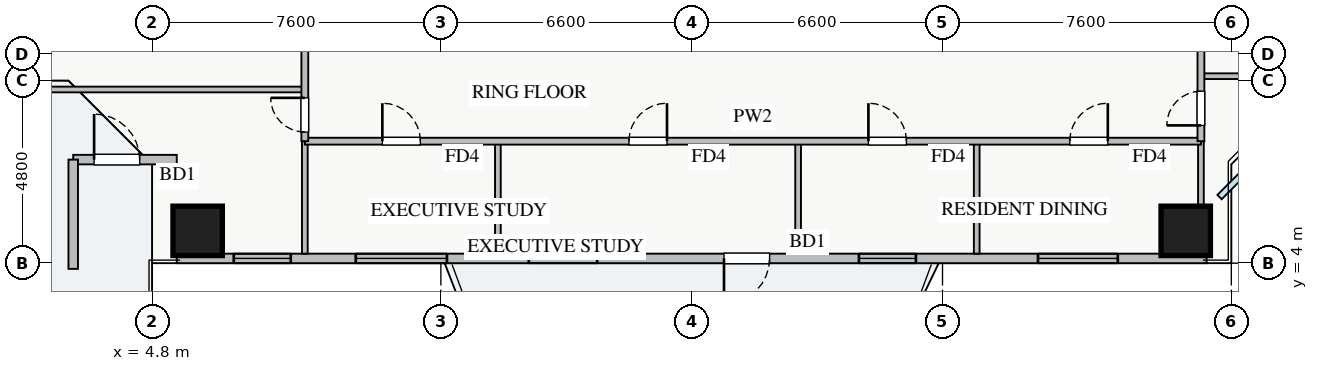
"""IFC4 building model, lengths in metres.
Left out: names, types, materials, properties, quantities, classifications, styles, units other than length and angle.
Written with IfcOpenShell. Run it as: python <this file> out.ifc"""

import sys

from ifc_helpers import new_model, si_unit, direction, frame, frame_2d, origin, origin_2d, place, context, subcontext, project, spatial, rectangle, extrude, source, transform, mapped, element, fill, save


model = new_model("IFC4")
c1 = context("Model", 3, precision=1e-05, world=origin(), true_north=direction((0.0, 1.0)))
c2 = subcontext(c1, "Body", "Model", "MODEL_VIEW")
j1 = project(units=[si_unit("LENGTHUNIT", "METRE"), si_unit("PLANEANGLEUNIT", "RADIAN")], contexts=[c1])
p1 = place(None, origin())
s1 = spatial("IfcSite", under=j1, at=p1, CompositionType="ELEMENT")
p2 = place(p1, origin())
s2 = spatial("IfcBuilding", under=s1, at=p2, CompositionType="ELEMENT")
p3 = place(p2, frame((0.0, 0.0, 53.5)))
s3 = spatial("IfcBuildingStorey", under=s2, at=p3, CompositionType="ELEMENT", Elevation=53.5)
m1 = source(origin(), c2, "Body", "SweptSolid", [
    extrude(rectangle(XDim=1.3, YDim=1.3, at=origin_2d()), origin(), (0.0, 0.0, 1.0), 3.25),
])
for number, where, z_axis, x_axis in (
    (1, (6.0, 4.85, 0.0), (0.0, 0.0, 1.0), (1.0, 0.0, 0.0)),
    (2, (32.0, 4.85, 0.0), (0.0, 0.0, 1.0), (1.0, 0.0, 0.0)),
):
    element("IfcColumn", number, at=place(p3, frame(where, z_axis=z_axis, x_axis=x_axis)), inside=s3, PredefinedType="COLUMN", context=c2, shape_type="MappedRepresentation", body=[
        mapped(m1, transform((0.0, 0.0, 0.0), x_axis=(1.0, 0.0, 0.0), y_axis=(0.0, 1.0, 0.0), z_axis=(0.0, 0.0, 1.0), scale=1.0)),
    ])
p4 = place(p3, frame((5.45, 4.125, 0.0), z_axis=(0.0, 0.0, 1.0), x_axis=(1.0, 0.0, 0.0)))
e3 = element("IfcWall", 3, at=p4, inside=s3, PredefinedType="STANDARD", context=c2, shape_type="SweptSolid", body=[
    extrude(rectangle(XDim=27.1, YDim=0.25, at=frame_2d((13.55, 0.0))), origin(), (0.0, 0.0, 1.0), 2.61),
])
p5 = place(p4, frame((14.4, 0.0, 0.0)))
e4 = element("IfcOpeningElement", 4, at=p5, cuts=e3, PredefinedType="OPENING", context=c2, shape_type="SweptSolid", body=[
    extrude(rectangle(XDim=1.2, YDim=2.1, at=frame_2d((0.6, 1.05))), frame((0.0, 0.135, 0.0), z_axis=(0.0, -1.0, 0.0), x_axis=(1.0, 0.0, 0.0)), (0.0, 0.0, 1.0), 0.27),
])
p6 = place(p4, frame((1.5, 0.0, 0.9)))
e5 = element("IfcOpeningElement", 5, at=p6, cuts=e3, PredefinedType="OPENING", context=c2, shape_type="SweptSolid", body=[
    extrude(rectangle(XDim=1.5, YDim=1.5, at=frame_2d((0.75, 0.75))), frame((0.0, 0.135, 0.0), z_axis=(0.0, -1.0, 0.0), x_axis=(1.0, 0.0, 0.0)), (0.0, 0.0, 1.0), 0.27),
])
p7 = place(p4, frame((9.263, 0.0, 0.9)))
e6 = element("IfcOpeningElement", 6, at=p7, cuts=e3, PredefinedType="OPENING", context=c2, shape_type="SweptSolid", body=[
    extrude(rectangle(XDim=1.8, YDim=1.45, at=frame_2d((0.9, 0.725))), frame((0.0, 0.135, 0.0), z_axis=(0.0, -1.0, 0.0), x_axis=(1.0, 0.0, 0.0)), (0.0, 0.0, 1.0), 0.27),
])
p8 = place(p4, frame((17.95, 0.0, 0.9)))
e7 = element("IfcOpeningElement", 7, at=p8, cuts=e3, PredefinedType="OPENING", context=c2, shape_type="SweptSolid", body=[
    extrude(rectangle(XDim=1.5, YDim=1.5, at=frame_2d((0.75, 0.75))), frame((0.0, 0.135, 0.0), z_axis=(0.0, -1.0, 0.0), x_axis=(1.0, 0.0, 0.0)), (0.0, 0.0, 1.0), 0.27),
])
p9 = place(p4, frame((22.663, 0.0, 0.9)))
e8 = element("IfcOpeningElement", 8, at=p9, cuts=e3, PredefinedType="OPENING", context=c2, shape_type="SweptSolid", body=[
    extrude(rectangle(XDim=2.1, YDim=1.48, at=frame_2d((1.05, 0.74))), frame((0.0, 0.135, 0.0), z_axis=(0.0, -1.0, 0.0), x_axis=(1.0, 0.0, 0.0)), (0.0, 0.0, 1.0), 0.27),
])
p10 = place(p4, frame((4.71, 0.0, 0.9)))
e9 = element("IfcOpeningElement", 9, at=p10, cuts=e3, PredefinedType="OPENING", context=c2, shape_type="SweptSolid", body=[
    extrude(rectangle(XDim=2.4, YDim=1.5, at=frame_2d((1.2, 0.75))), frame((0.0, 0.135, 0.0), z_axis=(0.0, -1.0, 0.0), x_axis=(1.0, 0.0, 0.0)), (0.0, 0.0, 1.0), 0.27),
])
p11 = place(p3, frame((2.725, 6.725, 0.0), z_axis=(0.0, 0.0, 1.0), x_axis=(1.0, 0.0, 0.0)))
e10 = element("IfcWall", 10, at=p11, inside=s3, PredefinedType="STANDARD", context=c2, shape_type="SweptSolid", body=[
    extrude(rectangle(XDim=2.725, YDim=0.25, at=frame_2d((1.362, 0.0))), origin(), (0.0, 0.0, 1.0), 2.61),
])
p12 = place(p11, frame((0.55, 0.0, 0.0)))
e11 = element("IfcOpeningElement", 11, at=p12, cuts=e10, PredefinedType="OPENING", context=c2, shape_type="SweptSolid", body=[
    extrude(rectangle(XDim=1.2, YDim=2.1, at=frame_2d((0.6, 1.05))), frame((0.0, 0.135, 0.0), z_axis=(0.0, -1.0, 0.0), x_axis=(1.0, 0.0, 0.0)), (0.0, 0.0, 1.0), 0.27),
])
p13 = place(p3, frame((2.725, 3.85, 0.0), z_axis=(0.0, 0.0, 1.0), x_axis=(0.0, 1.0, 0.0)))
e12 = element("IfcWall", 12, at=p13, inside=s3, PredefinedType="STANDARD", context=c2, shape_type="SweptSolid", body=[
    extrude(rectangle(XDim=2.875, YDim=0.25, at=frame_2d((1.438, 0.0))), origin(), (0.0, 0.0, 1.0), 2.61),
])
for number, where, z_axis, x_axis in (
    (13, (13.9, 4.25, 0.0), (0.0, 0.0, 1.0), (0.0, 1.0, 0.0)),
    (14, (21.8, 4.25, 0.0), (0.0, 0.0, 1.0), (0.0, 1.0, 0.0)),
    (15, (26.5, 4.25, 0.0), (0.0, 0.0, 1.0), (0.0, 1.0, 0.0)),
    (16, (8.82, 4.25, 0.0), (0.0, 0.0, 1.0), (0.0, 1.0, 0.0)),
    (17, (32.4, 4.25, 0.0), (0.0, 0.0, 1.0), (0.0, 1.0, 0.0)),
):
    element("IfcWall", number, at=place(p3, frame(where, z_axis=z_axis, x_axis=x_axis)), inside=s3, PredefinedType="PARTITIONING", context=c2, shape_type="SweptSolid", body=[
        extrude(rectangle(XDim=2.96, YDim=0.15, at=frame_2d((1.48, 0.0))), origin(), (0.0, 0.0, 1.0), 3.07),
    ])
p14 = place(p3, frame((8.82, 7.21, 0.0), z_axis=(0.0, 0.0, 1.0), x_axis=(1.0, 0.0, 0.0)))
e18 = element("IfcWall", 18, at=p14, inside=s3, PredefinedType="PARTITIONING", context=c2, shape_type="SweptSolid", body=[
    extrude(rectangle(XDim=23.58, YDim=0.18, at=frame_2d((11.79, 0.0))), origin(), (0.0, 0.0, 1.0), 3.07),
])
p15 = place(p14, frame((2.04, 0.0, 0.0)))
e19 = element("IfcOpeningElement", 19, at=p15, cuts=e18, PredefinedType="OPENING", context=c2, shape_type="SweptSolid", body=[
    extrude(rectangle(XDim=1.0, YDim=2.05, at=frame_2d((0.5, 1.025))), frame((0.0, 0.1, 0.0), z_axis=(0.0, -1.0, 0.0), x_axis=(1.0, 0.0, 0.0)), (0.0, 0.0, 1.0), 0.2),
])
p16 = place(p14, frame((8.53, 0.0, 0.0)))
e20 = element("IfcOpeningElement", 20, at=p16, cuts=e18, PredefinedType="OPENING", context=c2, shape_type="SweptSolid", body=[
    extrude(rectangle(XDim=1.0, YDim=2.05, at=frame_2d((0.5, 1.025))), frame((0.0, 0.1, 0.0), z_axis=(0.0, -1.0, 0.0), x_axis=(1.0, 0.0, 0.0)), (0.0, 0.0, 1.0), 0.2),
])
p17 = place(p14, frame((14.83, 0.0, 0.0)))
e21 = element("IfcOpeningElement", 21, at=p17, cuts=e18, PredefinedType="OPENING", context=c2, shape_type="SweptSolid", body=[
    extrude(rectangle(XDim=1.0, YDim=2.05, at=frame_2d((0.5, 1.025))), frame((0.0, 0.1, 0.0), z_axis=(0.0, -1.0, 0.0), x_axis=(1.0, 0.0, 0.0)), (0.0, 0.0, 1.0), 0.2),
])
p18 = place(p14, frame((20.13, 0.0, 0.0)))
e22 = element("IfcOpeningElement", 22, at=p18, cuts=e18, PredefinedType="OPENING", context=c2, shape_type="SweptSolid", body=[
    extrude(rectangle(XDim=1.0, YDim=2.05, at=frame_2d((0.5, 1.025))), frame((0.0, 0.1, 0.0), z_axis=(0.0, -1.0, 0.0), x_axis=(1.0, 0.0, 0.0)), (0.0, 0.0, 1.0), 0.2),
])
p19 = place(p3, frame((0.25, 8.57, 0.0), z_axis=(0.0, 0.0, 1.0), x_axis=(1.0, 0.0, 0.0)))
e23 = element("IfcWall", 23, at=p19, inside=s3, PredefinedType="PARTITIONING", context=c2, shape_type="SweptSolid", body=[
    extrude(rectangle(XDim=8.57, YDim=0.15, at=frame_2d((4.285, 0.0))), origin(), (0.0, 0.0, 1.0), 3.07),
])
p20 = place(p3, frame((8.82, 7.21, 0.0), z_axis=(0.0, 0.0, 1.0), x_axis=(0.0, 1.0, 0.0)))
e24 = element("IfcWall", 24, at=p20, inside=s3, PredefinedType="PARTITIONING", context=c2, shape_type="SweptSolid", body=[
    extrude(rectangle(XDim=31.23, YDim=0.18, at=frame_2d((15.615, 0.0))), origin(), (0.0, 0.0, 1.0), 3.07),
])
p21 = place(p20, frame((30.09, 0.0, 0.0)))
e25 = element("IfcOpeningElement", 25, at=p21, cuts=e24, PredefinedType="OPENING", context=c2, shape_type="SweptSolid", body=[
    extrude(rectangle(XDim=0.9, YDim=2.05, at=frame_2d((0.45, 1.025))), frame((0.0, 0.1, 0.0), z_axis=(0.0, -1.0, 0.0), x_axis=(1.0, 0.0, 0.0)), (0.0, 0.0, 1.0), 0.2),
])
p22 = place(p20, frame((0.24, 0.0, 0.0)))
e26 = element("IfcOpeningElement", 26, at=p22, cuts=e24, PredefinedType="OPENING", context=c2, shape_type="SweptSolid", body=[
    extrude(rectangle(XDim=0.9, YDim=2.05, at=frame_2d((0.45, 1.025))), frame((0.0, 0.1, 0.0), z_axis=(0.0, -1.0, 0.0), x_axis=(1.0, 0.0, 0.0)), (0.0, 0.0, 1.0), 0.2),
])
p23 = place(p20, frame((2.95, 0.0, 0.0)))
e27 = element("IfcOpeningElement", 27, at=p23, cuts=e24, PredefinedType="OPENING", context=c2, shape_type="SweptSolid", body=[
    extrude(rectangle(XDim=1.0, YDim=2.05, at=frame_2d((0.5, 1.025))), frame((0.0, 0.1, 0.0), z_axis=(0.0, -1.0, 0.0), x_axis=(1.0, 0.0, 0.0)), (0.0, 0.0, 1.0), 0.2),
])
p24 = place(p20, frame((15.115, 0.0, 0.0)))
e28 = element("IfcOpeningElement", 28, at=p24, cuts=e24, PredefinedType="OPENING", context=c2, shape_type="SweptSolid", body=[
    extrude(rectangle(XDim=1.0, YDim=2.05, at=frame_2d((0.5, 1.025))), frame((0.0, 0.1, 0.0), z_axis=(0.0, -1.0, 0.0), x_axis=(1.0, 0.0, 0.0)), (0.0, 0.0, 1.0), 0.2),
])
p25 = place(p20, frame((21.96, 0.0, 0.0)))
e29 = element("IfcOpeningElement", 29, at=p25, cuts=e24, PredefinedType="OPENING", context=c2, shape_type="SweptSolid", body=[
    extrude(rectangle(XDim=1.0, YDim=2.05, at=frame_2d((0.5, 1.025))), frame((0.0, 0.1, 0.0), z_axis=(0.0, -1.0, 0.0), x_axis=(1.0, 0.0, 0.0)), (0.0, 0.0, 1.0), 0.2),
])
p26 = place(p3, frame((32.4, 8.92, 0.0), z_axis=(0.0, 0.0, 1.0), x_axis=(1.0, 0.0, 0.0)))
e30 = element("IfcWall", 30, at=p26, inside=s3, PredefinedType="PARTITIONING", context=c2, shape_type="SweptSolid", body=[
    extrude(rectangle(XDim=5.35, YDim=0.15, at=frame_2d((2.675, 0.0))), origin(), (0.0, 0.0, 1.0), 3.07),
])
p27 = place(p3, frame((32.4, 7.21, 0.0), z_axis=(0.0, 0.0, 1.0), x_axis=(0.0, 1.0, 0.0)))
e31 = element("IfcWall", 31, at=p27, inside=s3, PredefinedType="PARTITIONING", context=c2, shape_type="SweptSolid", body=[
    extrude(rectangle(XDim=31.23, YDim=0.18, at=frame_2d((15.615, 0.0))), origin(), (0.0, 0.0, 1.0), 2.771),
])
p28 = place(p27, frame((30.09, 0.0, 0.0)))
e32 = element("IfcOpeningElement", 32, at=p28, cuts=e31, PredefinedType="OPENING", context=c2, shape_type="SweptSolid", body=[
    extrude(rectangle(XDim=0.9, YDim=2.05, at=frame_2d((0.45, 1.025))), frame((0.0, 0.1, 0.0), z_axis=(0.0, -1.0, 0.0), x_axis=(1.0, 0.0, 0.0)), (0.0, 0.0, 1.0), 0.2),
])
p29 = place(p27, frame((0.415, 0.0, 0.0)))
e33 = element("IfcOpeningElement", 33, at=p29, cuts=e31, PredefinedType="OPENING", context=c2, shape_type="SweptSolid", body=[
    extrude(rectangle(XDim=0.9, YDim=2.05, at=frame_2d((0.45, 1.025))), frame((0.0, 0.1, 0.0), z_axis=(0.0, -1.0, 0.0), x_axis=(1.0, 0.0, 0.0)), (0.0, 0.0, 1.0), 0.2),
])
p30 = place(p27, frame((3.585, 0.0, 0.0)))
e34 = element("IfcOpeningElement", 34, at=p30, cuts=e31, PredefinedType="OPENING", context=c2, shape_type="SweptSolid", body=[
    extrude(rectangle(XDim=1.0, YDim=2.05, at=frame_2d((0.5, 1.025))), frame((0.0, 0.1, 0.0), z_axis=(0.0, -1.0, 0.0), x_axis=(1.0, 0.0, 0.0)), (0.0, 0.0, 1.0), 0.2),
])
p31 = place(p27, frame((12.86, 0.0, 0.0)))
e35 = element("IfcOpeningElement", 35, at=p31, cuts=e31, PredefinedType="OPENING", context=c2, shape_type="SweptSolid", body=[
    extrude(rectangle(XDim=1.0, YDim=2.05, at=frame_2d((0.5, 1.025))), frame((0.0, 0.1, 0.0), z_axis=(0.0, -1.0, 0.0), x_axis=(1.0, 0.0, 0.0)), (0.0, 0.0, 1.0), 0.2),
])
p32 = place(p27, frame((22.5, 0.0, 0.0)))
e36 = element("IfcOpeningElement", 36, at=p32, cuts=e31, PredefinedType="OPENING", context=c2, shape_type="SweptSolid", body=[
    extrude(rectangle(XDim=1.0, YDim=2.05, at=frame_2d((0.5, 1.025))), frame((0.0, 0.1, 0.0), z_axis=(0.0, -1.0, 0.0), x_axis=(1.0, 0.0, 0.0)), (0.0, 0.0, 1.0), 0.2),
])
m2 = source(origin(), c2, "Body", "SweptSolid", [
    extrude(rectangle(XDim=1.2, YDim=2.1, at=frame_2d((0.6, 1.05))), frame((0.0, 0.025, 0.0), z_axis=(0.0, -1.0, 0.0), x_axis=(1.0, 0.0, 0.0)), (0.0, 0.0, 1.0), 0.05),
])
p33 = place(p5, frame((1.2, 0.0, 0.0), z_axis=(0.0, 0.0, 1.0), x_axis=(-1.0, 0.0, 0.0)))
e37 = element("IfcDoor", 37, at=p33, inside=s3, OperationType="SINGLE_SWING_LEFT", PredefinedType="DOOR", context=c2, shape_type="MappedRepresentation", body=[
    mapped(m2, transform((0.0, 0.0, 0.0), x_axis=(1.0, 0.0, 0.0), y_axis=(0.0, 1.0, 0.0), z_axis=(0.0, 0.0, 1.0), scale=1.0)),
])
fill(e4, e37)
m3 = source(origin(), c2, "Body", "SweptSolid", [
    extrude(rectangle(XDim=1.5, YDim=1.5, at=frame_2d((0.75, 0.75))), frame((0.0, 0.03, 0.0), z_axis=(0.0, -1.0, 0.0), x_axis=(1.0, 0.0, 0.0)), (0.0, 0.0, 1.0), 0.06),
])
p34 = place(p6, origin())
e38 = element("IfcWindow", 38, at=p34, inside=s3, PartitioningType="TRIPLE_PANEL_VERTICAL", PredefinedType="WINDOW", context=c2, shape_type="MappedRepresentation", body=[
    mapped(m3, transform((0.0, 0.0, 0.0), x_axis=(1.0, 0.0, 0.0), y_axis=(0.0, 1.0, 0.0), z_axis=(0.0, 0.0, 1.0), scale=1.0)),
])
fill(e5, e38)
m4 = source(origin(), c2, "Body", "SweptSolid", [
    extrude(rectangle(XDim=1.8, YDim=1.45, at=frame_2d((0.9, 0.725))), frame((0.0, 0.03, 0.0), z_axis=(0.0, -1.0, 0.0), x_axis=(1.0, 0.0, 0.0)), (0.0, 0.0, 1.0), 0.06),
])
p35 = place(p7, origin())
e39 = element("IfcWindow", 39, at=p35, inside=s3, PartitioningType="DOUBLE_PANEL_VERTICAL", PredefinedType="WINDOW", context=c2, shape_type="MappedRepresentation", body=[
    mapped(m4, transform((0.0, 0.0, 0.0), x_axis=(1.0, 0.0, 0.0), y_axis=(0.0, 1.0, 0.0), z_axis=(0.0, 0.0, 1.0), scale=1.0)),
])
fill(e6, e39)
p36 = place(p8, origin())
e40 = element("IfcWindow", 40, at=p36, inside=s3, PartitioningType="DOUBLE_PANEL_VERTICAL", PredefinedType="WINDOW", context=c2, shape_type="MappedRepresentation", body=[
    mapped(m3, transform((0.0, 0.0, 0.0), x_axis=(1.0, 0.0, 0.0), y_axis=(0.0, 1.0, 0.0), z_axis=(0.0, 0.0, 1.0), scale=1.0)),
])
fill(e7, e40)
m5 = source(origin(), c2, "Body", "SweptSolid", [
    extrude(rectangle(XDim=2.1, YDim=1.48, at=frame_2d((1.05, 0.74))), frame((0.0, 0.03, 0.0), z_axis=(0.0, -1.0, 0.0), x_axis=(1.0, 0.0, 0.0)), (0.0, 0.0, 1.0), 0.06),
])
p37 = place(p9, origin())
e41 = element("IfcWindow", 41, at=p37, inside=s3, PartitioningType="TRIPLE_PANEL_VERTICAL", PredefinedType="WINDOW", context=c2, shape_type="MappedRepresentation", body=[
    mapped(m5, transform((0.0, 0.0, 0.0), x_axis=(1.0, 0.0, 0.0), y_axis=(0.0, 1.0, 0.0), z_axis=(0.0, 0.0, 1.0), scale=1.0)),
])
fill(e8, e41)
p38 = place(p12, origin())
e42 = element("IfcDoor", 42, at=p38, inside=s3, OperationType="SINGLE_SWING_LEFT", PredefinedType="DOOR", context=c2, shape_type="MappedRepresentation", body=[
    mapped(m2, transform((0.0, 0.0, 0.0), x_axis=(1.0, 0.0, 0.0), y_axis=(0.0, 1.0, 0.0), z_axis=(0.0, 0.0, 1.0), scale=1.0)),
])
fill(e11, e42)
m6 = source(origin(), c2, "Body", "SweptSolid", [
    extrude(rectangle(XDim=1.0, YDim=2.05, at=frame_2d((0.5, 1.025))), frame((0.0, 0.025, 0.0), z_axis=(0.0, -1.0, 0.0), x_axis=(1.0, 0.0, 0.0)), (0.0, 0.0, 1.0), 0.05),
])
p39 = place(p15, origin())
e43 = element("IfcDoor", 43, at=p39, inside=s3, OperationType="SINGLE_SWING_LEFT", PredefinedType="DOOR", context=c2, shape_type="MappedRepresentation", body=[
    mapped(m6, transform((0.0, 0.0, 0.0), x_axis=(1.0, 0.0, 0.0), y_axis=(0.0, 1.0, 0.0), z_axis=(0.0, 0.0, 1.0), scale=1.0)),
])
fill(e19, e43)
p40 = place(p16, origin())
e44 = element("IfcDoor", 44, at=p40, inside=s3, OperationType="SINGLE_SWING_RIGHT", PredefinedType="DOOR", context=c2, shape_type="MappedRepresentation", body=[
    mapped(m6, transform((0.0, 0.0, 0.0), x_axis=(1.0, 0.0, 0.0), y_axis=(0.0, 1.0, 0.0), z_axis=(0.0, 0.0, 1.0), scale=1.0)),
])
fill(e20, e44)
p41 = place(p17, origin())
e45 = element("IfcDoor", 45, at=p41, inside=s3, OperationType="SINGLE_SWING_LEFT", PredefinedType="DOOR", context=c2, shape_type="MappedRepresentation", body=[
    mapped(m6, transform((0.0, 0.0, 0.0), x_axis=(1.0, 0.0, 0.0), y_axis=(0.0, 1.0, 0.0), z_axis=(0.0, 0.0, 1.0), scale=1.0)),
])
fill(e21, e45)
p42 = place(p18, origin())
e46 = element("IfcDoor", 46, at=p42, inside=s3, OperationType="SINGLE_SWING_RIGHT", PredefinedType="DOOR", context=c2, shape_type="MappedRepresentation", body=[
    mapped(m6, transform((0.0, 0.0, 0.0), x_axis=(1.0, 0.0, 0.0), y_axis=(0.0, 1.0, 0.0), z_axis=(0.0, 0.0, 1.0), scale=1.0)),
])
fill(e22, e46)
m7 = source(origin(), c2, "Body", "SweptSolid", [
    extrude(rectangle(XDim=0.9, YDim=2.05, at=frame_2d((0.45, 1.025))), frame((0.0, 0.025, 0.0), z_axis=(0.0, -1.0, 0.0), x_axis=(1.0, 0.0, 0.0)), (0.0, 0.0, 1.0), 0.05),
])
p43 = place(p22, origin())
e47 = element("IfcDoor", 47, at=p43, inside=s3, OperationType="SINGLE_SWING_RIGHT", PredefinedType="DOOR", context=c2, shape_type="MappedRepresentation", body=[
    mapped(m7, transform((0.0, 0.0, 0.0), x_axis=(1.0, 0.0, 0.0), y_axis=(0.0, 1.0, 0.0), z_axis=(0.0, 0.0, 1.0), scale=1.0)),
])
fill(e26, e47)
p44 = place(p29, origin())
e48 = element("IfcDoor", 48, at=p44, inside=s3, OperationType="SINGLE_SWING_LEFT", PredefinedType="DOOR", context=c2, shape_type="MappedRepresentation", body=[
    mapped(m7, transform((0.0, 0.0, 0.0), x_axis=(1.0, 0.0, 0.0), y_axis=(0.0, 1.0, 0.0), z_axis=(0.0, 0.0, 1.0), scale=1.0)),
])
fill(e33, e48)
m8 = source(origin(), c2, "Body", "SweptSolid", [
    extrude(rectangle(XDim=2.4, YDim=1.5, at=frame_2d((1.2, 0.75))), frame((0.0, 0.03, 0.0), z_axis=(0.0, -1.0, 0.0), x_axis=(1.0, 0.0, 0.0)), (0.0, 0.0, 1.0), 0.06),
])
p45 = place(p10, origin())
e49 = element("IfcWindow", 49, at=p45, inside=s3, PartitioningType="TRIPLE_PANEL_VERTICAL", PredefinedType="WINDOW", context=c2, shape_type="MappedRepresentation", body=[
    mapped(m8, transform((0.0, 0.0, 0.0), x_axis=(1.0, 0.0, 0.0), y_axis=(0.0, 1.0, 0.0), z_axis=(0.0, 0.0, 1.0), scale=1.0)),
])
fill(e9, e49)
save(model, sys.argv[1])
